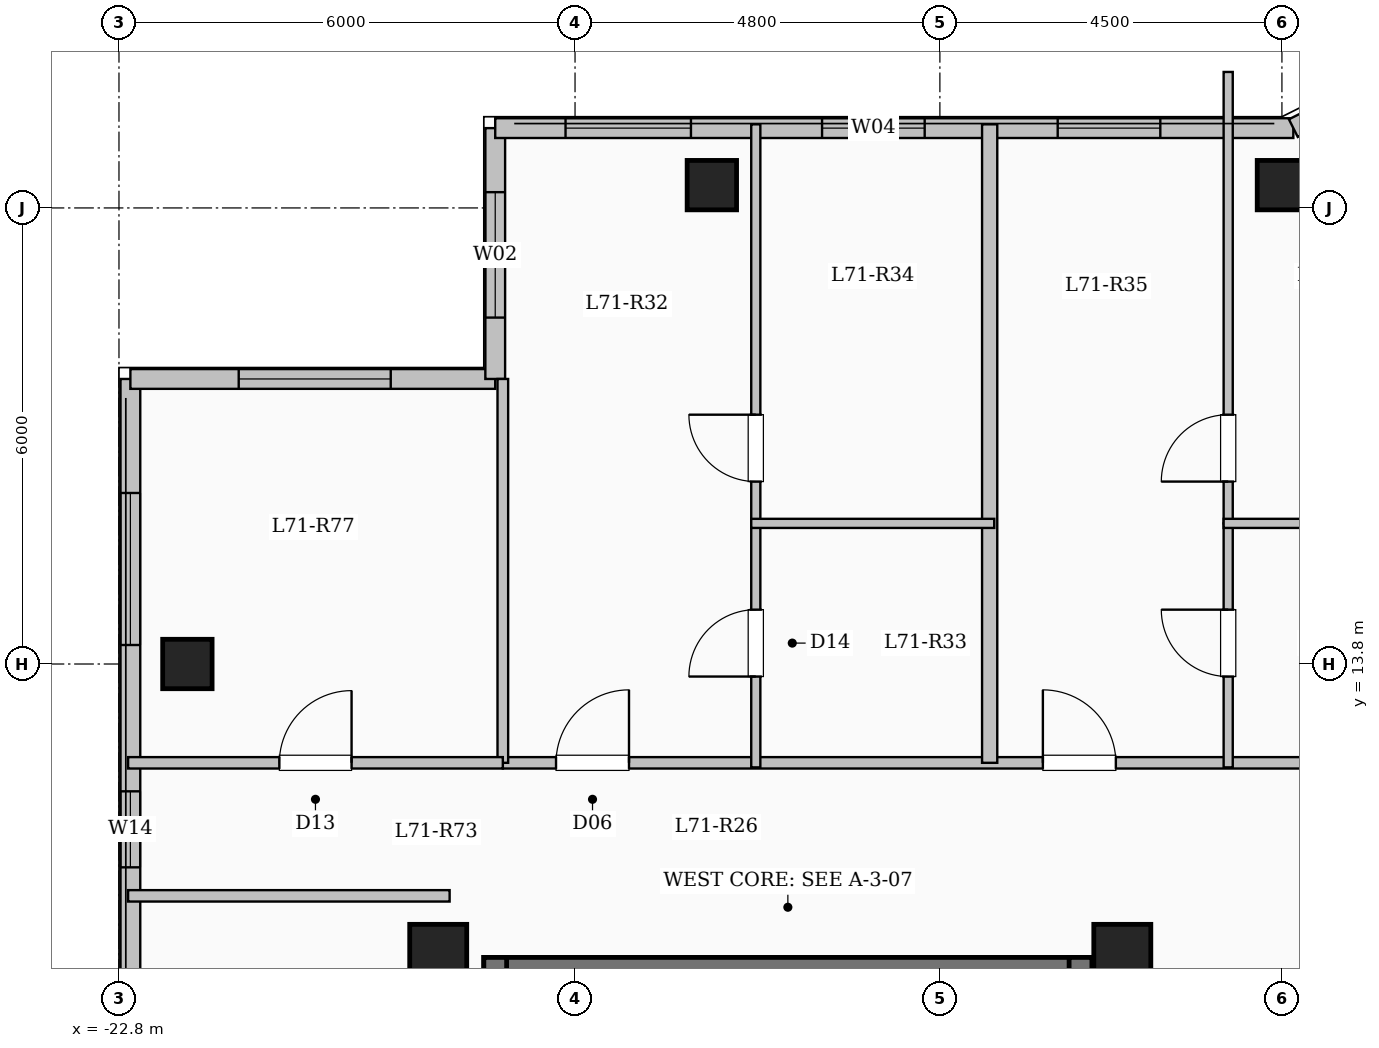
"""IFC4 building model, lengths in metres.
Left out: names, types, materials, properties, quantities, classifications, styles, units other than length and angle.
Written with IfcOpenShell. Run it as: python <this file> out.ifc"""

import sys

from ifc_helpers import new_model, si_unit, direction, frame, frame_2d, origin, origin_2d, place, context, subcontext, project, spatial, rectangle, extrude, element, fill, save


model = new_model("IFC4")
c1 = context("Model", 3, precision=1e-05, world=origin(), true_north=direction((0.0, 1.0)))
c2 = subcontext(c1, "Body", "Model", "MODEL_VIEW")
j1 = project(units=[si_unit("LENGTHUNIT", "METRE"), si_unit("PLANEANGLEUNIT", "RADIAN")], contexts=[c1])
p1 = place(None, origin())
s1 = spatial("IfcSite", under=j1, at=p1, CompositionType="ELEMENT")
p2 = place(p1, origin())
s2 = spatial("IfcBuilding", under=s1, at=p2, CompositionType="ELEMENT")
p3 = place(p2, frame((0.0, 0.0, 261.6)))
s3 = spatial("IfcBuildingStorey", under=s2, at=p3, CompositionType="ELEMENT", Elevation=261.6)
for number, where, z_axis, x_axis in (
    (1, (-9.6, 10.0, 0.0), (0.0, 0.0, 1.0), (1.0, 0.0, 0.0)),
    (2, (-18.6, 10.0, 0.0), (0.0, 0.0, 1.0), (1.0, 0.0, 0.0)),
):
    element("IfcColumn", number, at=place(p3, frame(where, z_axis=z_axis, x_axis=x_axis)), inside=s3, PredefinedType="COLUMN", context=c2, shape_type="SweptSolid", body=[
        extrude(rectangle(XDim=0.75, YDim=0.75, at=origin_2d()), origin(), (0.0, 0.0, 1.0), 3.35),
    ])
for number, where, z_axis, x_axis in (
    (3, (-15.0, 20.1, 0.0), (0.0, 0.0, 1.0), (1.0, 0.0, 0.0)),
    (4, (-7.5, 20.1, 0.0), (0.0, 0.0, 1.0), (1.0, 0.0, 0.0)),
    (5, (-21.9, 13.8, 0.0), (0.0, 0.0, 1.0), (1.0, 0.0, 0.0)),
):
    element("IfcColumn", number, at=place(p3, frame(where, z_axis=z_axis, x_axis=x_axis)), inside=s3, PredefinedType="COLUMN", context=c2, shape_type="SweptSolid", body=[
        extrude(rectangle(XDim=0.65, YDim=0.65, at=origin_2d()), origin(), (0.0, 0.0, 1.0), 3.35),
    ])
p4 = place(p3, frame((-22.65, -17.55, 0.0), z_axis=(0.0, 0.0, 1.0), x_axis=(0.0, 1.0, 0.0)))
e6 = element("IfcWall", 6, at=p4, inside=s3, PredefinedType="SOLIDWALL", context=c2, shape_type="SweptSolid", body=[
    extrude(rectangle(XDim=35.1, YDim=0.26, at=frame_2d((17.55, 0.0))), origin(), (0.0, 0.0, 1.0), 3.1),
])
p5 = place(p4, frame((2.975, 0.0, 0.9)))
e7 = element("IfcOpeningElement", 7, at=p5, cuts=e6, PredefinedType="OPENING", context=c2, shape_type="SweptSolid", body=[
    extrude(rectangle(XDim=2.2, YDim=1.75, at=frame_2d((1.1, 0.875))), frame((0.0, 0.14, 0.0), z_axis=(0.0, -1.0, 0.0), x_axis=(1.0, 0.0, 0.0)), (0.0, 0.0, 1.0), 0.28),
])
p6 = place(p4, frame((8.625, 0.0, 0.95)))
e8 = element("IfcOpeningElement", 8, at=p6, cuts=e6, PredefinedType="OPENING", context=c2, shape_type="SweptSolid", body=[
    extrude(rectangle(XDim=1.2, YDim=1.5, at=frame_2d((0.6, 0.75))), frame((0.0, 0.14, 0.0), z_axis=(0.0, -1.0, 0.0), x_axis=(1.0, 0.0, 0.0)), (0.0, 0.0, 1.0), 0.28),
])
p7 = place(p4, frame((18.3, 0.0, 0.9)))
e9 = element("IfcOpeningElement", 9, at=p7, cuts=e6, PredefinedType="OPENING", context=c2, shape_type="SweptSolid", body=[
    extrude(rectangle(XDim=2.0, YDim=1.7, at=frame_2d((1.0, 0.85))), frame((0.0, 0.14, 0.0), z_axis=(0.0, -1.0, 0.0), x_axis=(1.0, 0.0, 0.0)), (0.0, 0.0, 1.0), 0.28),
])
p8 = place(p4, frame((28.675, 0.0, 0.95)))
e10 = element("IfcOpeningElement", 10, at=p8, cuts=e6, PredefinedType="OPENING", context=c2, shape_type="SweptSolid", body=[
    extrude(rectangle(XDim=1.0, YDim=1.5, at=frame_2d((0.5, 0.75))), frame((0.0, 0.14, 0.0), z_axis=(0.0, -1.0, 0.0), x_axis=(1.0, 0.0, 0.0)), (0.0, 0.0, 1.0), 0.28),
])
p9 = place(p4, frame((31.6, 0.0, 0.9)))
e11 = element("IfcOpeningElement", 11, at=p9, cuts=e6, PredefinedType="OPENING", context=c2, shape_type="SweptSolid", body=[
    extrude(rectangle(XDim=2.0, YDim=1.7, at=frame_2d((1.0, 0.85))), frame((0.0, 0.14, 0.0), z_axis=(0.0, -1.0, 0.0), x_axis=(1.0, 0.0, 0.0)), (0.0, 0.0, 1.0), 0.28),
])
p10 = place(p3, frame((-22.65, 17.55, 0.0), z_axis=(0.0, 0.0, 1.0), x_axis=(1.0, 0.0, 0.0)))
e12 = element("IfcWall", 12, at=p10, inside=s3, PredefinedType="SOLIDWALL", context=c2, shape_type="SweptSolid", body=[
    extrude(rectangle(XDim=4.8, YDim=0.26, at=frame_2d((2.4, 0.0))), origin(), (0.0, 0.0, 1.0), 3.1),
])
p11 = place(p10, frame((1.425, 0.0, 0.9)))
e13 = element("IfcOpeningElement", 13, at=p11, cuts=e12, PredefinedType="OPENING", context=c2, shape_type="SweptSolid", body=[
    extrude(rectangle(XDim=2.0, YDim=1.7, at=frame_2d((1.0, 0.85))), frame((0.0, 0.14, 0.0), z_axis=(0.0, -1.0, 0.0), x_axis=(1.0, 0.0, 0.0)), (0.0, 0.0, 1.0), 0.28),
])
p12 = place(p3, frame((-17.85, 17.55, 0.0), z_axis=(0.0, 0.0, 1.0), x_axis=(0.0, 1.0, 0.0)))
e14 = element("IfcWall", 14, at=p12, inside=s3, PredefinedType="SOLIDWALL", context=c2, shape_type="SweptSolid", body=[
    extrude(rectangle(XDim=3.3, YDim=0.26, at=frame_2d((1.65, 0.0))), origin(), (0.0, 0.0, 1.0), 3.1),
])
p13 = place(p12, frame((0.808, 0.0, 0.9)))
e15 = element("IfcOpeningElement", 15, at=p13, cuts=e14, PredefinedType="OPENING", context=c2, shape_type="SweptSolid", body=[
    extrude(rectangle(XDim=1.65, YDim=1.6, at=frame_2d((0.825, 0.8))), frame((0.0, 0.14, 0.0), z_axis=(0.0, -1.0, 0.0), x_axis=(1.0, 0.0, 0.0)), (0.0, 0.0, 1.0), 0.28),
])
p14 = place(p3, frame((-17.85, 20.85, 0.0), z_axis=(0.0, 0.0, 1.0), x_axis=(1.0, 0.0, 0.0)))
e16 = element("IfcWall", 16, at=p14, inside=s3, PredefinedType="SOLIDWALL", context=c2, shape_type="SweptSolid", body=[
    extrude(rectangle(XDim=10.5, YDim=0.26, at=frame_2d((5.25, 0.0))), origin(), (0.0, 0.0, 1.0), 3.1),
])
p15 = place(p14, frame((0.925, 0.0, 0.9)))
e17 = element("IfcOpeningElement", 17, at=p15, cuts=e16, PredefinedType="OPENING", context=c2, shape_type="SweptSolid", body=[
    extrude(rectangle(XDim=1.65, YDim=1.6, at=frame_2d((0.825, 0.8))), frame((0.0, 0.14, 0.0), z_axis=(0.0, -1.0, 0.0), x_axis=(1.0, 0.0, 0.0)), (0.0, 0.0, 1.0), 0.28),
])
p16 = place(p14, frame((4.3, 0.0, 0.95)))
e18 = element("IfcOpeningElement", 18, at=p16, cuts=e16, PredefinedType="OPENING", context=c2, shape_type="SweptSolid", body=[
    extrude(rectangle(XDim=1.35, YDim=1.55, at=frame_2d((0.675, 0.775))), frame((0.0, 0.14, 0.0), z_axis=(0.0, -1.0, 0.0), x_axis=(1.0, 0.0, 0.0)), (0.0, 0.0, 1.0), 0.28),
])
p17 = place(p14, frame((7.4, 0.0, 0.95)))
e19 = element("IfcOpeningElement", 19, at=p17, cuts=e16, PredefinedType="OPENING", context=c2, shape_type="SweptSolid", body=[
    extrude(rectangle(XDim=1.35, YDim=1.55, at=frame_2d((0.675, 0.775))), frame((0.0, 0.14, 0.0), z_axis=(0.0, -1.0, 0.0), x_axis=(1.0, 0.0, 0.0)), (0.0, 0.0, 1.0), 0.28),
])
p18 = place(p3, frame((-7.35, 20.85, 0.0), z_axis=(0.0, 0.0, 1.0), x_axis=(0.894427191, 0.4472135955, 0.0)))
e20 = element("IfcWall", 20, at=p18, inside=s3, PredefinedType="SOLIDWALL", context=c2, shape_type="SweptSolid", body=[
    extrude(rectangle(XDim=3.354, YDim=0.26, at=frame_2d((1.677, 0.0))), origin(), (0.0, 0.0, 1.0), 3.1),
])
p19 = place(p18, frame((0.401, 0.0, 0.95)))
e21 = element("IfcOpeningElement", 21, at=p19, cuts=e20, PredefinedType="OPENING", context=c2, shape_type="SweptSolid", body=[
    extrude(rectangle(XDim=1.0, YDim=1.5, at=frame_2d((0.5, 0.75))), frame((0.0, 0.14, 0.0), z_axis=(0.0, -1.0, 0.0), x_axis=(1.0, 0.0, 0.0)), (0.0, 0.0, 1.0), 0.28),
])
p20 = place(p3, frame((-18.0, 9.79, 0.0), z_axis=(0.0, 0.0, 1.0), x_axis=(1.0, 0.0, 0.0)))
e22 = element("IfcWall", 22, at=p20, inside=s3, PredefinedType="SHEAR", context=c2, shape_type="SweptSolid", body=[
    extrude(rectangle(XDim=8.0, YDim=0.3, at=frame_2d((4.0, 0.0))), origin(), (0.0, 0.0, 1.0), 3.35),
])
for number, where, z_axis, x_axis in (
    (23, (-17.85, 6.35, 0.0), (0.0, 0.0, 1.0), (0.0, 1.0, 0.0)),
    (24, (-10.15, 6.35, 0.0), (0.0, 0.0, 1.0), (0.0, 1.0, 0.0)),
):
    element("IfcWall", number, at=place(p3, frame(where, z_axis=z_axis, x_axis=x_axis)), inside=s3, PredefinedType="SHEAR", context=c2, shape_type="SweptSolid", body=[
        extrude(rectangle(XDim=3.59, YDim=0.3, at=frame_2d((1.795, 0.0))), origin(), (0.0, 0.0, 1.0), 3.35),
    ])
p21 = place(p3, frame((-17.75, 12.5, 0.0), z_axis=(0.0, 0.0, 1.0), x_axis=(1.0, 0.0, 0.0)))
e25 = element("IfcWall", 25, at=p21, inside=s3, PredefinedType="PARTITIONING", context=c2, shape_type="SweptSolid", body=[
    extrude(rectangle(XDim=13.9, YDim=0.15, at=frame_2d((6.95, 0.0))), origin(), (0.0, 0.0, 1.0), 3.1),
])
p22 = place(p21, frame((0.7, 0.0, 0.0)))
e26 = element("IfcOpeningElement", 26, at=p22, cuts=e25, PredefinedType="OPENING", context=c2, shape_type="SweptSolid", body=[
    extrude(rectangle(XDim=0.96, YDim=2.15, at=frame_2d((0.48, 1.075))), frame((0.0, 0.085, 0.0), z_axis=(0.0, -1.0, 0.0), x_axis=(1.0, 0.0, 0.0)), (0.0, 0.0, 1.0), 0.17),
])
p23 = place(p21, frame((7.105, 0.0, 0.0)))
e27 = element("IfcOpeningElement", 27, at=p23, cuts=e25, PredefinedType="OPENING", context=c2, shape_type="SweptSolid", body=[
    extrude(rectangle(XDim=0.96, YDim=2.15, at=frame_2d((0.48, 1.075))), frame((0.0, 0.085, 0.0), z_axis=(0.0, -1.0, 0.0), x_axis=(1.0, 0.0, 0.0)), (0.0, 0.0, 1.0), 0.17),
])
p24 = place(p21, frame((12.57, 0.0, 0.0)))
e28 = element("IfcOpeningElement", 28, at=p24, cuts=e25, PredefinedType="OPENING", context=c2, shape_type="SweptSolid", body=[
    extrude(rectangle(XDim=0.96, YDim=2.15, at=frame_2d((0.48, 1.075))), frame((0.0, 0.085, 0.0), z_axis=(0.0, -1.0, 0.0), x_axis=(1.0, 0.0, 0.0)), (0.0, 0.0, 1.0), 0.17),
])
p25 = place(p3, frame((-11.345, 12.5, 0.0), z_axis=(0.0, 0.0, 1.0), x_axis=(0.0, 1.0, 0.0)))
e29 = element("IfcWall", 29, at=p25, inside=s3, PredefinedType="SOLIDWALL", context=c2, shape_type="SweptSolid", body=[
    extrude(rectangle(XDim=8.4, YDim=0.2, at=frame_2d((4.2, 0.0))), origin(), (0.0, 0.0, 1.0), 3.1),
])
p26 = place(p3, frame((-14.422, 12.44, 0.0), z_axis=(0.0, 0.0, 1.0), x_axis=(0.0, 1.0, 0.0)))
e30 = element("IfcWall", 30, at=p26, inside=s3, PredefinedType="PARTITIONING", context=c2, shape_type="SweptSolid", body=[
    extrude(rectangle(XDim=3.21, YDim=0.12, at=frame_2d((1.605, 0.0))), origin(), (0.0, 0.0, 1.0), 3.1),
])
p27 = place(p26, frame((1.195, 0.0, 0.0)))
e31 = element("IfcOpeningElement", 31, at=p27, cuts=e30, PredefinedType="OPENING", context=c2, shape_type="SweptSolid", body=[
    extrude(rectangle(XDim=0.88, YDim=2.1, at=frame_2d((0.44, 1.05))), frame((0.0, 0.07, 0.0), z_axis=(0.0, -1.0, 0.0), x_axis=(1.0, 0.0, 0.0)), (0.0, 0.0, 1.0), 0.14),
])
p28 = place(p3, frame((-14.422, 15.65, 0.0), z_axis=(0.0, 0.0, 1.0), x_axis=(0.0, 1.0, 0.0)))
e32 = element("IfcWall", 32, at=p28, inside=s3, PredefinedType="PARTITIONING", context=c2, shape_type="SweptSolid", body=[
    extrude(rectangle(XDim=5.25, YDim=0.12, at=frame_2d((2.625, 0.0))), origin(), (0.0, 0.0, 1.0), 3.1),
])
p29 = place(p28, frame((0.55, 0.0, 0.0)))
e33 = element("IfcOpeningElement", 33, at=p29, cuts=e32, PredefinedType="OPENING", context=c2, shape_type="SweptSolid", body=[
    extrude(rectangle(XDim=0.88, YDim=2.1, at=frame_2d((0.44, 1.05))), frame((0.0, 0.07, 0.0), z_axis=(0.0, -1.0, 0.0), x_axis=(1.0, 0.0, 0.0)), (0.0, 0.0, 1.0), 0.14),
])
p30 = place(p3, frame((-14.482, 15.65, 0.0), z_axis=(0.0, 0.0, 1.0), x_axis=(1.0, 0.0, 0.0)))
e34 = element("IfcWall", 34, at=p30, inside=s3, PredefinedType="PARTITIONING", context=c2, shape_type="SweptSolid", body=[
    extrude(rectangle(XDim=3.197, YDim=0.12, at=frame_2d((1.599, 0.0))), origin(), (0.0, 0.0, 1.0), 2.785),
])
p31 = place(p3, frame((-8.207, 12.44, 0.0), z_axis=(0.0, 0.0, 1.0), x_axis=(0.0, 1.0, 0.0)))
e35 = element("IfcWall", 35, at=p31, inside=s3, PredefinedType="PARTITIONING", context=c2, shape_type="SweptSolid", body=[
    extrude(rectangle(XDim=3.21, YDim=0.12, at=frame_2d((1.605, 0.0))), origin(), (0.0, 0.0, 1.0), 3.1),
])
p32 = place(p31, frame((1.195, 0.0, 0.0)))
e36 = element("IfcOpeningElement", 36, at=p32, cuts=e35, PredefinedType="OPENING", context=c2, shape_type="SweptSolid", body=[
    extrude(rectangle(XDim=0.88, YDim=2.1, at=frame_2d((0.44, 1.05))), frame((0.0, 0.07, 0.0), z_axis=(0.0, -1.0, 0.0), x_axis=(1.0, 0.0, 0.0)), (0.0, 0.0, 1.0), 0.14),
])
p33 = place(p3, frame((-8.207, 15.65, 0.0), z_axis=(0.0, 0.0, 1.0), x_axis=(0.0, 1.0, 0.0)))
e37 = element("IfcWall", 37, at=p33, inside=s3, PredefinedType="PARTITIONING", context=c2, shape_type="SweptSolid", body=[
    extrude(rectangle(XDim=5.939, YDim=0.12, at=frame_2d((2.97, 0.0))), origin(), (0.0, 0.0, 1.0), 3.1),
])
p34 = place(p33, frame((0.55, 0.0, 0.0)))
e38 = element("IfcOpeningElement", 38, at=p34, cuts=e37, PredefinedType="OPENING", context=c2, shape_type="SweptSolid", body=[
    extrude(rectangle(XDim=0.88, YDim=2.1, at=frame_2d((0.44, 1.05))), frame((0.0, 0.07, 0.0), z_axis=(0.0, -1.0, 0.0), x_axis=(1.0, 0.0, 0.0)), (0.0, 0.0, 1.0), 0.14),
])
p35 = place(p3, frame((-8.267, 15.65, 0.0), z_axis=(0.0, 0.0, 1.0), x_axis=(1.0, 0.0, 0.0)))
e39 = element("IfcWall", 39, at=p35, inside=s3, PredefinedType="PARTITIONING", context=c2, shape_type="SweptSolid", body=[
    extrude(rectangle(XDim=3.021, YDim=0.12, at=frame_2d((1.51, 0.0))), origin(), (0.0, 0.0, 1.0), 2.785),
])
p36 = place(p3, frame((-22.68, 10.75, 0.0), z_axis=(0.0, 0.0, 1.0), x_axis=(1.0, 0.0, 0.0)))
e40 = element("IfcWall", 40, at=p36, inside=s3, PredefinedType="PARTITIONING", context=c2, shape_type="SweptSolid", body=[
    extrude(rectangle(XDim=4.23, YDim=0.15, at=frame_2d((2.115, 0.0))), origin(), (0.0, 0.0, 1.0), 3.1),
])
p37 = place(p3, frame((-17.75, 12.5, 0.0), z_axis=(0.0, 0.0, 1.0), x_axis=(0.0, 1.0, 0.0)))
e41 = element("IfcWall", 41, at=p37, inside=s3, PredefinedType="PARTITIONING", context=c2, shape_type="SweptSolid", body=[
    extrude(rectangle(XDim=5.05, YDim=0.14, at=frame_2d((2.525, 0.0))), origin(), (0.0, 0.0, 1.0), 3.1),
])
p38 = place(p3, frame((-22.68, 12.5, 0.0), z_axis=(0.0, 0.0, 1.0), x_axis=(1.0, 0.0, 0.0)))
e42 = element("IfcWall", 42, at=p38, inside=s3, PredefinedType="PARTITIONING", context=c2, shape_type="SweptSolid", body=[
    extrude(rectangle(XDim=4.93, YDim=0.15, at=frame_2d((2.465, 0.0))), origin(), (0.0, 0.0, 1.0), 3.1),
])
p39 = place(p38, frame((1.99, 0.0, 0.0)))
e43 = element("IfcOpeningElement", 43, at=p39, cuts=e42, PredefinedType="OPENING", context=c2, shape_type="SweptSolid", body=[
    extrude(rectangle(XDim=0.95, YDim=2.15, at=frame_2d((0.475, 1.075))), frame((0.0, 0.085, 0.0), z_axis=(0.0, -1.0, 0.0), x_axis=(1.0, 0.0, 0.0)), (0.0, 0.0, 1.0), 0.17),
])
p40 = place(p8, origin())
e44 = element("IfcWindow", 44, at=p40, inside=s3, PartitioningType="SINGLE_PANEL", PredefinedType="WINDOW", context=c2, shape_type="SweptSolid", body=[
    extrude(rectangle(XDim=1.0, YDim=1.5, at=frame_2d((0.5, 0.75))), frame((0.0, 0.03, 0.0), z_axis=(0.0, -1.0, 0.0), x_axis=(1.0, 0.0, 0.0)), (0.0, 0.0, 1.0), 0.06),
])
fill(e10, e44)
p41 = place(p9, origin())
e45 = element("IfcWindow", 45, at=p41, inside=s3, PartitioningType="SINGLE_PANEL", PredefinedType="WINDOW", context=c2, shape_type="SweptSolid", body=[
    extrude(rectangle(XDim=2.0, YDim=1.7, at=frame_2d((1.0, 0.85))), frame((0.0, 0.03, 0.0), z_axis=(0.0, -1.0, 0.0), x_axis=(1.0, 0.0, 0.0)), (0.0, 0.0, 1.0), 0.06),
])
fill(e11, e45)
p42 = place(p11, origin())
e46 = element("IfcWindow", 46, at=p42, inside=s3, PartitioningType="SINGLE_PANEL", PredefinedType="WINDOW", context=c2, shape_type="SweptSolid", body=[
    extrude(rectangle(XDim=2.0, YDim=1.7, at=frame_2d((1.0, 0.85))), frame((0.0, 0.03, 0.0), z_axis=(0.0, -1.0, 0.0), x_axis=(1.0, 0.0, 0.0)), (0.0, 0.0, 1.0), 0.06),
])
fill(e13, e46)
p43 = place(p13, origin())
e47 = element("IfcWindow", 47, at=p43, inside=s3, PartitioningType="SINGLE_PANEL", PredefinedType="WINDOW", context=c2, shape_type="SweptSolid", body=[
    extrude(rectangle(XDim=1.65, YDim=1.6, at=frame_2d((0.825, 0.8))), frame((0.0, 0.03, 0.0), z_axis=(0.0, -1.0, 0.0), x_axis=(1.0, 0.0, 0.0)), (0.0, 0.0, 1.0), 0.06),
])
fill(e15, e47)
p44 = place(p15, origin())
e48 = element("IfcWindow", 48, at=p44, inside=s3, PartitioningType="SINGLE_PANEL", PredefinedType="WINDOW", context=c2, shape_type="SweptSolid", body=[
    extrude(rectangle(XDim=1.65, YDim=1.6, at=frame_2d((0.825, 0.8))), frame((0.0, 0.03, 0.0), z_axis=(0.0, -1.0, 0.0), x_axis=(1.0, 0.0, 0.0)), (0.0, 0.0, 1.0), 0.06),
])
fill(e17, e48)
p45 = place(p16, origin())
e49 = element("IfcWindow", 49, at=p45, inside=s3, PartitioningType="SINGLE_PANEL", PredefinedType="WINDOW", context=c2, shape_type="SweptSolid", body=[
    extrude(rectangle(XDim=1.35, YDim=1.55, at=frame_2d((0.675, 0.775))), frame((0.0, 0.03, 0.0), z_axis=(0.0, -1.0, 0.0), x_axis=(1.0, 0.0, 0.0)), (0.0, 0.0, 1.0), 0.06),
])
fill(e18, e49)
p46 = place(p17, origin())
e50 = element("IfcWindow", 50, at=p46, inside=s3, PartitioningType="SINGLE_PANEL", PredefinedType="WINDOW", context=c2, shape_type="SweptSolid", body=[
    extrude(rectangle(XDim=1.35, YDim=1.55, at=frame_2d((0.675, 0.775))), frame((0.0, 0.03, 0.0), z_axis=(0.0, -1.0, 0.0), x_axis=(1.0, 0.0, 0.0)), (0.0, 0.0, 1.0), 0.06),
])
fill(e19, e50)
p47 = place(p22, origin())
e51 = element("IfcDoor", 51, at=p47, inside=s3, OperationType="SINGLE_SWING_RIGHT", PredefinedType="DOOR", context=c2, shape_type="SweptSolid", body=[
    extrude(rectangle(XDim=0.96, YDim=2.15, at=frame_2d((0.48, 1.075))), frame((0.0, 0.025, 0.0), z_axis=(0.0, -1.0, 0.0), x_axis=(1.0, 0.0, 0.0)), (0.0, 0.0, 1.0), 0.05),
])
fill(e26, e51)
p48 = place(p27, origin())
e52 = element("IfcDoor", 52, at=p48, inside=s3, OperationType="SINGLE_SWING_LEFT", PredefinedType="DOOR", context=c2, shape_type="SweptSolid", body=[
    extrude(rectangle(XDim=0.88, YDim=2.1, at=frame_2d((0.44, 1.05))), frame((0.0, 0.025, 0.0), z_axis=(0.0, -1.0, 0.0), x_axis=(1.0, 0.0, 0.0)), (0.0, 0.0, 1.0), 0.05),
])
fill(e31, e52)
p49 = place(p29, origin())
e53 = element("IfcDoor", 53, at=p49, inside=s3, OperationType="SINGLE_SWING_RIGHT", PredefinedType="DOOR", context=c2, shape_type="SweptSolid", body=[
    extrude(rectangle(XDim=0.88, YDim=2.1, at=frame_2d((0.44, 1.05))), frame((0.0, 0.025, 0.0), z_axis=(0.0, -1.0, 0.0), x_axis=(1.0, 0.0, 0.0)), (0.0, 0.0, 1.0), 0.05),
])
fill(e33, e53)
p50 = place(p23, origin())
e54 = element("IfcDoor", 54, at=p50, inside=s3, OperationType="SINGLE_SWING_LEFT", PredefinedType="DOOR", context=c2, shape_type="SweptSolid", body=[
    extrude(rectangle(XDim=0.96, YDim=2.15, at=frame_2d((0.48, 1.075))), frame((0.0, 0.025, 0.0), z_axis=(0.0, -1.0, 0.0), x_axis=(1.0, 0.0, 0.0)), (0.0, 0.0, 1.0), 0.05),
])
fill(e27, e54)
p51 = place(p32, origin())
e55 = element("IfcDoor", 55, at=p51, inside=s3, OperationType="SINGLE_SWING_RIGHT", PredefinedType="DOOR", context=c2, shape_type="SweptSolid", body=[
    extrude(rectangle(XDim=0.88, YDim=2.1, at=frame_2d((0.44, 1.05))), frame((0.0, 0.025, 0.0), z_axis=(0.0, -1.0, 0.0), x_axis=(1.0, 0.0, 0.0)), (0.0, 0.0, 1.0), 0.05),
])
fill(e36, e55)
p52 = place(p34, origin())
e56 = element("IfcDoor", 56, at=p52, inside=s3, OperationType="SINGLE_SWING_LEFT", PredefinedType="DOOR", context=c2, shape_type="SweptSolid", body=[
    extrude(rectangle(XDim=0.88, YDim=2.1, at=frame_2d((0.44, 1.05))), frame((0.0, 0.025, 0.0), z_axis=(0.0, -1.0, 0.0), x_axis=(1.0, 0.0, 0.0)), (0.0, 0.0, 1.0), 0.05),
])
fill(e38, e56)
p53 = place(p39, origin())
e57 = element("IfcDoor", 57, at=p53, inside=s3, OperationType="SINGLE_SWING_RIGHT", PredefinedType="DOOR", context=c2, shape_type="SweptSolid", body=[
    extrude(rectangle(XDim=0.95, YDim=2.15, at=frame_2d((0.475, 1.075))), frame((0.0, 0.025, 0.0), z_axis=(0.0, -1.0, 0.0), x_axis=(1.0, 0.0, 0.0)), (0.0, 0.0, 1.0), 0.05),
])
fill(e43, e57)
save(model, sys.argv[1])
